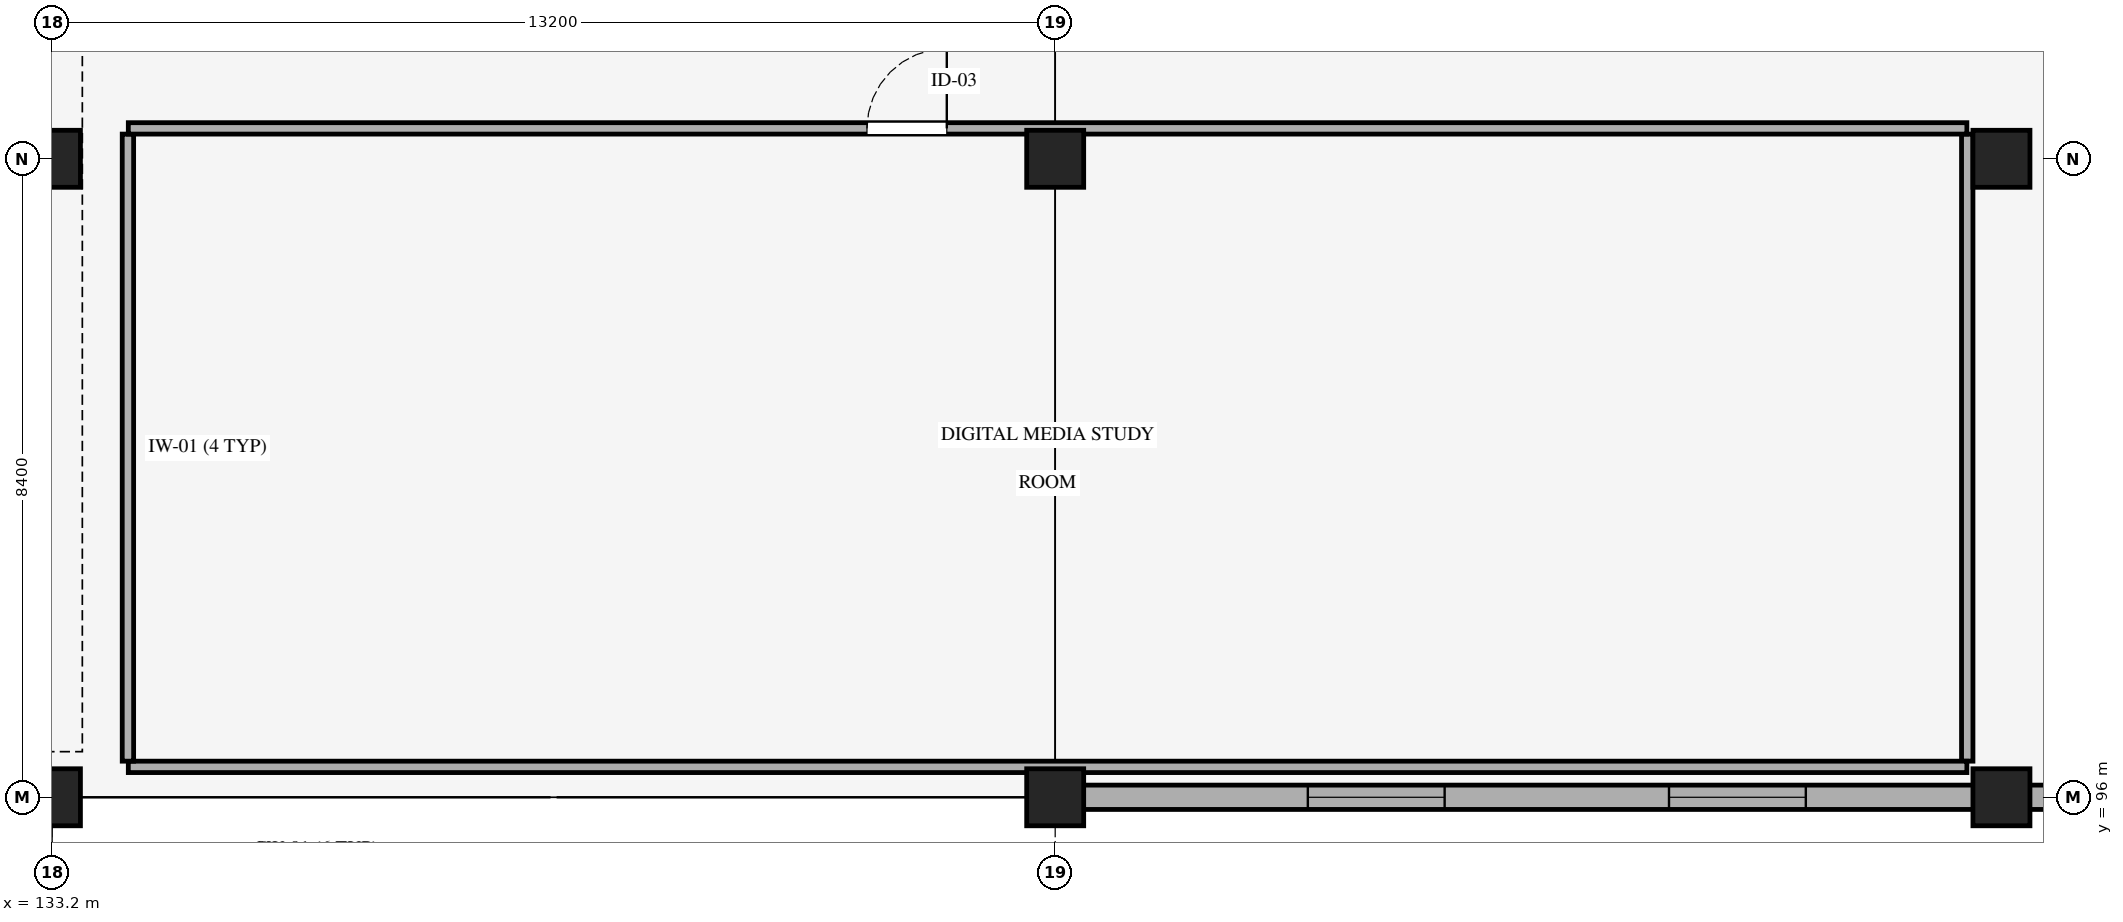
"""IFC4 building model, lengths in metres.
Left out: names, types, materials, properties, quantities, classifications, styles, units other than length and angle.
Written with IfcOpenShell. Run it as: python <this file> out.ifc"""

import sys

from ifc_helpers import new_model, si_unit, direction, frame, frame_2d, origin, origin_2d, place, context, subcontext, project, spatial, rectangle, extrude, element, fill, save


model = new_model("IFC4")
c1 = context("Model", 3, precision=1e-05, world=origin(), true_north=direction((0.0, 1.0)))
c2 = subcontext(c1, "Body", "Model", "MODEL_VIEW")
j1 = project(units=[si_unit("LENGTHUNIT", "METRE"), si_unit("PLANEANGLEUNIT", "RADIAN")], contexts=[c1])
p1 = place(None, origin())
s1 = spatial("IfcSite", under=j1, at=p1, CompositionType="ELEMENT")
p2 = place(p1, origin())
s2 = spatial("IfcBuilding", under=s1, at=p2, CompositionType="ELEMENT")
p3 = place(p2, frame((0.0, 0.0, 4.8)))
s3 = spatial("IfcBuildingStorey", under=s2, at=p3, CompositionType="ELEMENT", Elevation=4.8)
for number, where, z_axis, x_axis in (
    (1, (133.2, 96.0, 0.0), (0.0, 0.0, 1.0), (1.0, 0.0, 0.0)),
    (2, (133.2, 104.4, 0.0), (0.0, 0.0, 1.0), (1.0, 0.0, 0.0)),
    (3, (146.4, 96.0, 0.0), (0.0, 0.0, 1.0), (1.0, 0.0, 0.0)),
    (4, (146.4, 104.4, 0.0), (0.0, 0.0, 1.0), (1.0, 0.0, 0.0)),
    (5, (158.85, 96.0, 0.0), (0.0, 0.0, 1.0), (1.0, 0.0, 0.0)),
    (6, (158.85, 104.4, 0.0), (0.0, 0.0, 1.0), (1.0, 0.0, 0.0)),
):
    element("IfcColumn", number, at=place(p3, frame(where, z_axis=z_axis, x_axis=x_axis)), inside=s3, PredefinedType="COLUMN", context=c2, shape_type="SweptSolid", body=[
        extrude(rectangle(XDim=0.75, YDim=0.75, at=origin_2d()), origin(), (0.0, 0.0, 1.0), 4.8),
    ])
p4 = place(p3, frame((159.6, 96.0, 0.0), z_axis=(0.0, 0.0, 1.0), x_axis=(-1.0, 0.0, 0.0)))
e7 = element("IfcWall", 7, at=p4, inside=s3, PredefinedType="STANDARD", context=c2, shape_type="SweptSolid", body=[
    extrude(rectangle(XDim=13.2, YDim=0.32, at=frame_2d((6.6, 0.0))), origin(), (0.0, 0.0, 1.0), 3.755),
])
p5 = place(p4, frame((3.324, 0.0, 0.9)))
e8 = element("IfcOpeningElement", 8, at=p5, cuts=e7, PredefinedType="OPENING", context=c2, shape_type="SweptSolid", body=[
    extrude(rectangle(XDim=1.8, YDim=1.8, at=frame_2d((0.9, 0.9))), frame((0.0, 0.17, 0.0), z_axis=(0.0, -1.0, 0.0), x_axis=(1.0, 0.0, 0.0)), (0.0, 0.0, 1.0), 0.34),
])
p6 = place(p4, frame((8.076, 0.0, 0.9)))
e9 = element("IfcOpeningElement", 9, at=p6, cuts=e7, PredefinedType="OPENING", context=c2, shape_type="SweptSolid", body=[
    extrude(rectangle(XDim=1.8, YDim=1.8, at=frame_2d((0.9, 0.9))), frame((0.0, 0.17, 0.0), z_axis=(0.0, -1.0, 0.0), x_axis=(1.0, 0.0, 0.0)), (0.0, 0.0, 1.0), 0.34),
])
p7 = place(p3, frame((158.4, 104.725, 0.0), z_axis=(0.0, 0.0, 1.0), x_axis=(0.0, -1.0, 0.0)))
e10 = element("IfcWall", 10, at=p7, inside=s3, PredefinedType="STANDARD", context=c2, shape_type="SweptSolid", body=[
    extrude(rectangle(XDim=8.25, YDim=0.15, at=frame_2d((4.125, 0.0))), origin(), (0.0, 0.0, 1.0), 3.755),
])
p8 = place(p3, frame((158.395, 96.4, 0.0), z_axis=(0.0, 0.0, 1.0), x_axis=(-1.0, 0.0, 0.0)))
e11 = element("IfcWall", 11, at=p8, inside=s3, PredefinedType="STANDARD", context=c2, shape_type="SweptSolid", body=[
    extrude(rectangle(XDim=24.19, YDim=0.15, at=frame_2d((12.095, 0.0))), origin(), (0.0, 0.0, 1.0), 3.755),
])
p9 = place(p3, frame((134.2, 96.475, 0.0), z_axis=(0.0, 0.0, 1.0), x_axis=(0.0, 1.0, 0.0)))
e12 = element("IfcWall", 12, at=p9, inside=s3, PredefinedType="STANDARD", context=c2, shape_type="SweptSolid", body=[
    extrude(rectangle(XDim=8.25, YDim=0.15, at=frame_2d((4.125, 0.0))), origin(), (0.0, 0.0, 1.0), 4.54),
])
p10 = place(p3, frame((134.205, 104.8, 0.0), z_axis=(0.0, 0.0, 1.0), x_axis=(1.0, 0.0, 0.0)))
e13 = element("IfcWall", 13, at=p10, inside=s3, PredefinedType="STANDARD", context=c2, shape_type="SweptSolid", body=[
    extrude(rectangle(XDim=24.19, YDim=0.15, at=frame_2d((12.095, 0.0))), origin(), (0.0, 0.0, 1.0), 3.755),
])
p11 = place(p10, frame((9.719, 0.0, 0.0)))
e14 = element("IfcOpeningElement", 14, at=p11, cuts=e13, PredefinedType="OPENING", context=c2, shape_type="SweptSolid", body=[
    extrude(rectangle(XDim=1.05, YDim=2.15, at=frame_2d((0.525, 1.075))), frame((0.0, 0.085, 0.0), z_axis=(0.0, -1.0, 0.0), x_axis=(1.0, 0.0, 0.0)), (0.0, 0.0, 1.0), 0.17),
])
p12 = place(p5, origin())
e15 = element("IfcWindow", 15, at=p12, inside=s3, PartitioningType="SINGLE_PANEL", PredefinedType="WINDOW", context=c2, shape_type="SweptSolid", body=[
    extrude(rectangle(XDim=1.8, YDim=1.8, at=frame_2d((0.9, 0.9))), frame((0.0, 0.03, 0.0), z_axis=(0.0, -1.0, 0.0), x_axis=(1.0, 0.0, 0.0)), (0.0, 0.0, 1.0), 0.06),
])
fill(e8, e15)
p13 = place(p6, origin())
e16 = element("IfcWindow", 16, at=p13, inside=s3, PartitioningType="SINGLE_PANEL", PredefinedType="WINDOW", context=c2, shape_type="SweptSolid", body=[
    extrude(rectangle(XDim=1.8, YDim=1.8, at=frame_2d((0.9, 0.9))), frame((0.0, 0.03, 0.0), z_axis=(0.0, -1.0, 0.0), x_axis=(1.0, 0.0, 0.0)), (0.0, 0.0, 1.0), 0.06),
])
fill(e9, e16)
p14 = place(p11, origin())
e17 = element("IfcDoor", 17, at=p14, inside=s3, OperationType="SINGLE_SWING_RIGHT", PredefinedType="DOOR", context=c2, shape_type="SweptSolid", body=[
    extrude(rectangle(XDim=1.05, YDim=2.15, at=frame_2d((0.525, 1.075))), frame((0.0, 0.025, 0.0), z_axis=(0.0, -1.0, 0.0), x_axis=(1.0, 0.0, 0.0)), (0.0, 0.0, 1.0), 0.05),
])
fill(e14, e17)
save(model, sys.argv[1])
